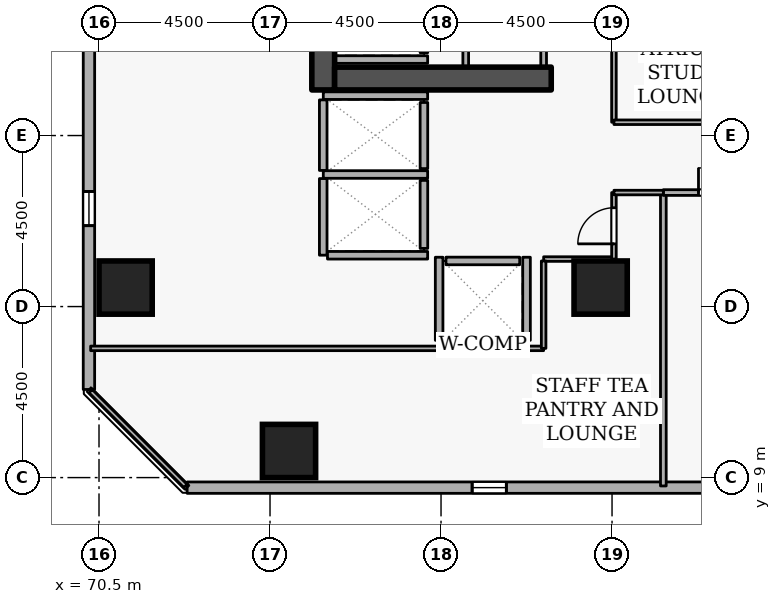
"""IFC4 building model, lengths in metres.
Left out: names, types, materials, properties, quantities, classifications, styles, units other than length and angle.
Written with IfcOpenShell. Run it as: python <this file> out.ifc"""

import sys

from ifc_helpers import new_model, si_unit, direction, frame, frame_2d, origin, origin_2d, place, context, subcontext, project, spatial, rectangle, extrude, element, fill, save


model = new_model("IFC4")
c1 = context("Model", 3, precision=1e-05, world=origin(), true_north=direction((0.0, 1.0)))
c2 = subcontext(c1, "Body", "Model", "MODEL_VIEW")
j1 = project(units=[si_unit("LENGTHUNIT", "METRE"), si_unit("PLANEANGLEUNIT", "RADIAN")], contexts=[c1])
p1 = place(None, origin())
s1 = spatial("IfcSite", under=j1, at=p1, CompositionType="ELEMENT")
p2 = place(p1, origin())
s2 = spatial("IfcBuilding", under=s1, at=p2, CompositionType="ELEMENT")
p3 = place(p2, frame((0.0, 0.0, 60.9)))
s3 = spatial("IfcBuildingStorey", under=s2, at=p3, CompositionType="ELEMENT", Elevation=60.9)
p4 = place(p3, frame((76.4, 19.2, 0.0), z_axis=(0.0, 0.0, 1.0), x_axis=(0.0, 1.0, 0.0)))
e1 = element("IfcWall", 1, at=p4, inside=s3, PredefinedType="SHEAR", context=c2, shape_type="SweptSolid", body=[
    extrude(rectangle(XDim=15.6, YDim=0.6, at=frame_2d((7.8, 0.0))), origin(), (0.0, 0.0, 1.0), 3.6),
])
p5 = place(p3, frame((76.7, 19.5, 0.0), z_axis=(0.0, 0.0, 1.0), x_axis=(1.0, 0.0, 0.0)))
e2 = element("IfcWall", 2, at=p5, inside=s3, PredefinedType="SHEAR", context=c2, shape_type="SweptSolid", body=[
    extrude(rectangle(XDim=5.7, YDim=0.6, at=frame_2d((2.85, 0.0))), origin(), (0.0, 0.0, 1.0), 3.6),
])
for number, where, z_axis, x_axis in (
    (3, (71.2, 14.0, 0.0), (0.0, 0.0, 1.0), (1.0, 0.0, 0.0)),
    (4, (75.5, 9.7, 0.0), (0.0, 0.0, 1.0), (1.0, 0.0, 0.0)),
    (5, (83.7, 14.0, 0.0), (0.0, 0.0, 1.0), (1.0, 0.0, 0.0)),
):
    element("IfcColumn", number, at=place(p3, frame(where, z_axis=z_axis, x_axis=x_axis)), inside=s3, PredefinedType="COLUMN", context=c2, shape_type="SweptSolid", body=[
        extrude(rectangle(XDim=1.4, YDim=1.4, at=origin_2d()), origin(), (0.0, 0.0, 1.0), 3.6),
    ])
p6 = place(p3, frame((72.819, 8.735, 0.0), z_axis=(0.0, 0.0, 1.0), x_axis=(0.999999998209, 5.985515e-05, 0.0)))
e6 = element("IfcWall", 6, at=p6, inside=s3, PredefinedType="STANDARD", context=c2, shape_type="SweptSolid", body=[
    extrude(rectangle(XDim=36.71, YDim=0.3, at=frame_2d((18.355, 0.0))), origin(), (0.0, 0.0, 1.0), 2.7),
])
p7 = place(p6, frame((7.5, 0.0, 0.72)))
e7 = element("IfcOpeningElement", 7, at=p7, cuts=e6, PredefinedType="OPENING", context=c2, shape_type="SweptSolid", body=[
    extrude(rectangle(XDim=0.9, YDim=1.75, at=frame_2d((0.45, 0.875))), frame((0.0, 0.16, 0.0), z_axis=(0.0, -1.0, 0.0), x_axis=(1.0, 0.0, 0.0)), (0.0, 0.0, 1.0), 0.32),
])
p8 = place(p6, frame((17.1, 0.0, 0.72)))
e8 = element("IfcOpeningElement", 8, at=p8, cuts=e6, PredefinedType="OPENING", context=c2, shape_type="SweptSolid", body=[
    extrude(rectangle(XDim=0.9, YDim=1.75, at=frame_2d((0.45, 0.875))), frame((0.0, 0.16, 0.0), z_axis=(0.0, -1.0, 0.0), x_axis=(1.0, 0.0, 0.0)), (0.0, 0.0, 1.0), 0.32),
])
p9 = place(p6, frame((21.9, 0.0, 0.72)))
e9 = element("IfcOpeningElement", 9, at=p9, cuts=e6, PredefinedType="OPENING", context=c2, shape_type="SweptSolid", body=[
    extrude(rectangle(XDim=0.9, YDim=1.75, at=frame_2d((0.45, 0.875))), frame((0.0, 0.16, 0.0), z_axis=(0.0, -1.0, 0.0), x_axis=(1.0, 0.0, 0.0)), (0.0, 0.0, 1.0), 0.32),
])
p10 = place(p6, frame((26.7, 0.0, 0.72)))
e10 = element("IfcOpeningElement", 10, at=p10, cuts=e6, PredefinedType="OPENING", context=c2, shape_type="SweptSolid", body=[
    extrude(rectangle(XDim=0.9, YDim=1.75, at=frame_2d((0.45, 0.875))), frame((0.0, 0.16, 0.0), z_axis=(0.0, -1.0, 0.0), x_axis=(1.0, 0.0, 0.0)), (0.0, 0.0, 1.0), 0.32),
])
p11 = place(p3, frame((70.237, 48.029, 0.0), z_axis=(0.0, 0.0, 1.0), x_axis=(-5.985515e-05, -0.999999998209, 0.0)))
e11 = element("IfcWall", 11, at=p11, inside=s3, PredefinedType="STANDARD", context=c2, shape_type="SweptSolid", body=[
    extrude(rectangle(XDim=36.71, YDim=0.3, at=frame_2d((18.355, 0.0))), origin(), (0.0, 0.0, 1.0), 2.7),
])
p12 = place(p11, frame((2.7, 0.0, 0.72)))
e12 = element("IfcOpeningElement", 12, at=p12, cuts=e11, PredefinedType="OPENING", context=c2, shape_type="SweptSolid", body=[
    extrude(rectangle(XDim=0.9, YDim=1.75, at=frame_2d((0.45, 0.875))), frame((0.0, 0.16, 0.0), z_axis=(0.0, -1.0, 0.0), x_axis=(1.0, 0.0, 0.0)), (0.0, 0.0, 1.0), 0.32),
])
p13 = place(p11, frame((12.3, 0.0, 0.72)))
e13 = element("IfcOpeningElement", 13, at=p13, cuts=e11, PredefinedType="OPENING", context=c2, shape_type="SweptSolid", body=[
    extrude(rectangle(XDim=0.9, YDim=1.75, at=frame_2d((0.45, 0.875))), frame((0.0, 0.16, 0.0), z_axis=(0.0, -1.0, 0.0), x_axis=(1.0, 0.0, 0.0)), (0.0, 0.0, 1.0), 0.32),
])
p14 = place(p11, frame((17.1, 0.0, 0.72)))
e14 = element("IfcOpeningElement", 14, at=p14, cuts=e11, PredefinedType="OPENING", context=c2, shape_type="SweptSolid", body=[
    extrude(rectangle(XDim=0.9, YDim=1.75, at=frame_2d((0.45, 0.875))), frame((0.0, 0.16, 0.0), z_axis=(0.0, -1.0, 0.0), x_axis=(1.0, 0.0, 0.0)), (0.0, 0.0, 1.0), 0.32),
])
p15 = place(p11, frame((26.7, 0.0, 0.72)))
e15 = element("IfcOpeningElement", 15, at=p15, cuts=e11, PredefinedType="OPENING", context=c2, shape_type="SweptSolid", body=[
    extrude(rectangle(XDim=0.9, YDim=1.75, at=frame_2d((0.45, 0.875))), frame((0.0, 0.16, 0.0), z_axis=(0.0, -1.0, 0.0), x_axis=(1.0, 0.0, 0.0)), (0.0, 0.0, 1.0), 0.32),
])
p16 = place(p11, frame((31.5, 0.0, 0.72)))
e16 = element("IfcOpeningElement", 16, at=p16, cuts=e11, PredefinedType="OPENING", context=c2, shape_type="SweptSolid", body=[
    extrude(rectangle(XDim=0.9, YDim=1.75, at=frame_2d((0.45, 0.875))), frame((0.0, 0.16, 0.0), z_axis=(0.0, -1.0, 0.0), x_axis=(1.0, 0.0, 0.0)), (0.0, 0.0, 1.0), 0.32),
])
p17 = place(p3, frame((79.05, 20.18, 0.0), z_axis=(0.0, 0.0, 1.0), x_axis=(0.0, 1.0, 0.0)))
e17 = element("IfcWall", 17, at=p17, inside=s3, PredefinedType="STANDARD", context=c2, shape_type="SweptSolid", body=[
    extrude(rectangle(XDim=1.94, YDim=0.2, at=frame_2d((0.97, 0.0))), origin(), (0.0, 0.0, 1.0), 3.34),
])
p18 = place(p3, frame((79.05, 17.13, 0.0), z_axis=(0.0, 0.0, 1.0), x_axis=(0.0, 1.0, 0.0)))
e18 = element("IfcWall", 18, at=p18, inside=s3, PredefinedType="STANDARD", context=c2, shape_type="SweptSolid", body=[
    extrude(rectangle(XDim=1.74, YDim=0.2, at=frame_2d((0.87, 0.0))), origin(), (0.0, 0.0, 1.0), 3.34),
])
p19 = place(p3, frame((79.05, 15.03, 0.0), z_axis=(0.0, 0.0, 1.0), x_axis=(0.0, 1.0, 0.0)))
e19 = element("IfcWall", 19, at=p19, inside=s3, PredefinedType="STANDARD", context=c2, shape_type="SweptSolid", body=[
    extrude(rectangle(XDim=1.79, YDim=0.2, at=frame_2d((0.895, 0.0))), origin(), (0.0, 0.0, 1.0), 3.34),
])
p20 = place(p3, frame((79.63, 14.7, 0.0), z_axis=(0.0, 0.0, 1.0), x_axis=(1.0, 0.0, 0.0)))
e20 = element("IfcWall", 20, at=p20, inside=s3, PredefinedType="STANDARD", context=c2, shape_type="SweptSolid", body=[
    extrude(rectangle(XDim=1.94, YDim=0.2, at=frame_2d((0.97, 0.0))), origin(), (0.0, 0.0, 1.0), 3.34),
])
p21 = place(p3, frame((76.712, 20.0, 0.0), z_axis=(0.0, 0.0, 1.0), x_axis=(1.0, 0.0, 0.0)))
e21 = element("IfcWall", 21, at=p21, inside=s3, PredefinedType="STANDARD", context=c2, shape_type="SweptSolid", body=[
    extrude(rectangle(XDim=2.436, YDim=0.2, at=frame_2d((1.218, 0.0))), origin(), (0.0, 0.0, 1.0), 3.34),
])
p22 = place(p3, frame((76.402, 19.05, 0.0), z_axis=(0.0, 0.0, 1.0), x_axis=(1.0, 0.0, 0.0)))
e22 = element("IfcWall", 22, at=p22, inside=s3, PredefinedType="STANDARD", context=c2, shape_type="SweptSolid", body=[
    extrude(rectangle(XDim=2.746, YDim=0.2, at=frame_2d((1.373, 0.0))), origin(), (0.0, 0.0, 1.0), 2.545),
])
p23 = place(p3, frame((76.402, 16.975, 0.0), z_axis=(0.0, 0.0, 1.0), x_axis=(1.0, 0.0, 0.0)))
e23 = element("IfcWall", 23, at=p23, inside=s3, PredefinedType="STANDARD", context=c2, shape_type="SweptSolid", body=[
    extrude(rectangle(XDim=2.746, YDim=0.2, at=frame_2d((1.373, 0.0))), origin(), (0.0, 0.0, 1.0), 3.34),
])
p24 = place(p3, frame((76.4, 14.852, 0.0), z_axis=(0.0, 0.0, 1.0), x_axis=(0.0, 1.0, 0.0)))
e24 = element("IfcWall", 24, at=p24, inside=s3, PredefinedType="STANDARD", context=c2, shape_type="SweptSolid", body=[
    extrude(rectangle(XDim=2.016, YDim=0.2, at=frame_2d((1.008, 0.0))), origin(), (0.0, 0.0, 1.0), 3.34),
])
p25 = place(p3, frame((76.4, 17.082, 0.0), z_axis=(0.0, 0.0, 1.0), x_axis=(0.0, 1.0, 0.0)))
e25 = element("IfcWall", 25, at=p25, inside=s3, PredefinedType="STANDARD", context=c2, shape_type="SweptSolid", body=[
    extrude(rectangle(XDim=1.856, YDim=0.2, at=frame_2d((0.928, 0.0))), origin(), (0.0, 0.0, 1.0), 3.34),
])
p26 = place(p3, frame((76.512, 14.85, 0.0), z_axis=(0.0, 0.0, 1.0), x_axis=(1.0, 0.0, 0.0)))
e26 = element("IfcWall", 26, at=p26, inside=s3, PredefinedType="STANDARD", context=c2, shape_type="SweptSolid", body=[
    extrude(rectangle(XDim=2.636, YDim=0.2, at=frame_2d((1.318, 0.0))), origin(), (0.0, 0.0, 1.0), 3.34),
])
p27 = place(p3, frame((79.452, 12.5, 0.0), z_axis=(0.0, 0.0, 1.0), x_axis=(1.0, 0.0, 0.0)))
e27 = element("IfcWall", 27, at=p27, inside=s3, PredefinedType="STANDARD", context=c2, shape_type="SweptSolid", body=[
    extrude(rectangle(XDim=2.296, YDim=0.2, at=frame_2d((1.148, 0.0))), origin(), (0.0, 0.0, 1.0), 3.34),
])
for number, where, z_axis, x_axis in (
    (28, (81.75, 12.612, 0.0), (0.0, 0.0, 1.0), (0.0, 1.0, 0.0)),
    (29, (79.45, 12.612, 0.0), (0.0, 0.0, 1.0), (0.0, 1.0, 0.0)),
):
    element("IfcWall", number, at=place(p3, frame(where, z_axis=z_axis, x_axis=x_axis)), inside=s3, PredefinedType="STANDARD", context=c2, shape_type="SweptSolid", body=[
        extrude(rectangle(XDim=2.186, YDim=0.2, at=frame_2d((1.093, 0.0))), origin(), (0.0, 0.0, 1.0), 3.34),
    ])
p28 = place(p3, frame((80.15, 19.8, 0.0), z_axis=(0.0, 0.0, 1.0), x_axis=(0.0, 1.0, 0.0)))
e30 = element("IfcWall", 30, at=p28, inside=s3, PredefinedType="PARTITIONING", context=c2, shape_type="SweptSolid", body=[
    extrude(rectangle(XDim=4.25, YDim=0.15, at=frame_2d((2.125, 0.0))), origin(), (0.0, 0.0, 1.0), 3.34),
])
p29 = place(p3, frame((82.2, 24.05, 0.0), z_axis=(0.0, 0.0, 1.0), x_axis=(0.0, -1.0, 0.0)))
e31 = element("IfcWall", 31, at=p29, inside=s3, PredefinedType="PARTITIONING", context=c2, shape_type="SweptSolid", body=[
    extrude(rectangle(XDim=4.25, YDim=0.15, at=frame_2d((2.125, 0.0))), origin(), (0.0, 0.0, 1.0), 3.34),
])
p30 = place(p29, frame((1.665, 0.0, 0.0)))
e32 = element("IfcOpeningElement", 32, at=p30, cuts=e31, PredefinedType="OPENING", context=c2, shape_type="SweptSolid", body=[
    extrude(rectangle(XDim=0.92, YDim=2.08, at=frame_2d((0.46, 1.04))), frame((0.0, 0.085, 0.0), z_axis=(0.0, -1.0, 0.0), x_axis=(1.0, 0.0, 0.0)), (0.0, 0.0, 1.0), 0.17),
])
p31 = place(p3, frame((85.35, 8.78, 0.0), z_axis=(0.0, 0.0, 1.0), x_axis=(0.0, 1.0, 0.0)))
e33 = element("IfcWall", 33, at=p31, inside=s3, PredefinedType="PARTITIONING", context=c2, shape_type="SweptSolid", body=[
    extrude(rectangle(XDim=7.72, YDim=0.15, at=frame_2d((3.86, 0.0))), origin(), (0.0, 0.0, 1.0), 3.34),
])
p32 = place(p3, frame((85.35, 16.5, 0.0), z_axis=(0.0, 0.0, 1.0), x_axis=(1.0, 0.0, 0.0)))
e34 = element("IfcWall", 34, at=p32, inside=s3, PredefinedType="PARTITIONING", context=c2, shape_type="SweptSolid", body=[
    extrude(rectangle(XDim=3.15, YDim=0.15, at=frame_2d((1.575, 0.0))), origin(), (0.0, 0.0, 1.0), 3.34),
])
p33 = place(p32, frame((0.925, 0.0, 0.0)))
e35 = element("IfcOpeningElement", 35, at=p33, cuts=e34, PredefinedType="OPENING", context=c2, shape_type="SweptSolid", body=[
    extrude(rectangle(XDim=1.3, YDim=2.12, at=frame_2d((0.65, 1.06))), frame((0.0, 0.085, 0.0), z_axis=(0.0, -1.0, 0.0), x_axis=(1.0, 0.0, 0.0)), (0.0, 0.0, 1.0), 0.17),
])
p34 = place(p3, frame((82.2, 14.75, 0.0), z_axis=(0.0, 0.0, 1.0), x_axis=(1.0, 0.0, 0.0)))
e36 = element("IfcWall", 36, at=p34, inside=s3, PredefinedType="PARTITIONING", context=c2, shape_type="SweptSolid", body=[
    extrude(rectangle(XDim=1.85, YDim=0.12, at=frame_2d((0.925, 0.0))), origin(), (0.0, 0.0, 1.0), 3.34),
])
p35 = place(p3, frame((84.05, 14.75, 0.0), z_axis=(0.0, 0.0, 1.0), x_axis=(0.0, 1.0, 0.0)))
e37 = element("IfcWall", 37, at=p35, inside=s3, PredefinedType="PARTITIONING", context=c2, shape_type="SweptSolid", body=[
    extrude(rectangle(XDim=1.75, YDim=0.12, at=frame_2d((0.875, 0.0))), origin(), (0.0, 0.0, 1.0), 3.34),
])
p36 = place(p35, frame((0.4, 0.0, 0.0)))
e38 = element("IfcOpeningElement", 38, at=p36, cuts=e37, PredefinedType="OPENING", context=c2, shape_type="SweptSolid", body=[
    extrude(rectangle(XDim=0.95, YDim=2.1, at=frame_2d((0.475, 1.05))), frame((0.0, 0.07, 0.0), z_axis=(0.0, -1.0, 0.0), x_axis=(1.0, 0.0, 0.0)), (0.0, 0.0, 1.0), 0.14),
])
p37 = place(p3, frame((84.05, 16.5, 0.0), z_axis=(0.0, 0.0, 1.0), x_axis=(1.0, 0.0, 0.0)))
e39 = element("IfcWall", 39, at=p37, inside=s3, PredefinedType="PARTITIONING", context=c2, shape_type="SweptSolid", body=[
    extrude(rectangle(XDim=1.3, YDim=0.12, at=frame_2d((0.65, 0.0))), origin(), (0.0, 0.0, 1.0), 3.34),
])
p38 = place(p3, frame((72.775, 8.78, 0.0), z_axis=(0.0, 0.0, 1.0), x_axis=(-0.707106781187, 0.707106781187, 0.0)))
e40 = element("IfcWall", 40, at=p38, inside=s3, PredefinedType="PARTITIONING", context=c2, shape_type="SweptSolid", body=[
    extrude(rectangle(XDim=3.528, YDim=0.12, at=frame_2d((1.764, 0.0))), origin(), (0.0, 0.0, 1.0), 3.34),
])
p39 = place(p3, frame((70.28, 12.4, 0.0), z_axis=(0.0, 0.0, 1.0), x_axis=(1.0, 0.0, 0.0)))
e41 = element("IfcWall", 41, at=p39, inside=s3, PredefinedType="PARTITIONING", context=c2, shape_type="SweptSolid", body=[
    extrude(rectangle(XDim=9.172, YDim=0.12, at=frame_2d((4.586, 0.0))), origin(), (0.0, 0.0, 1.0), 3.34),
])
p40 = place(p3, frame((81.748, 12.4, 0.0), z_axis=(0.0, 0.0, 1.0), x_axis=(1.0, 0.0, 0.0)))
e42 = element("IfcWall", 42, at=p40, inside=s3, PredefinedType="PARTITIONING", context=c2, shape_type="SweptSolid", body=[
    extrude(rectangle(XDim=0.452, YDim=0.12, at=frame_2d((0.226, 0.0))), origin(), (0.0, 0.0, 1.0), 3.34),
])
p41 = place(p3, frame((82.2, 12.4, 0.0), z_axis=(0.0, 0.0, 1.0), x_axis=(0.0, 1.0, 0.0)))
e43 = element("IfcWall", 43, at=p41, inside=s3, PredefinedType="PARTITIONING", context=c2, shape_type="SweptSolid", body=[
    extrude(rectangle(XDim=2.3, YDim=0.12, at=frame_2d((1.15, 0.0))), origin(), (0.0, 0.0, 1.0), 3.34),
])
p42 = place(p3, frame((84.05, 18.35, 0.0), z_axis=(0.0, 0.0, 1.0), x_axis=(0.0, 1.0, 0.0)))
e44 = element("IfcWall", 44, at=p42, inside=s3, PredefinedType="PARTITIONING", context=c2, shape_type="SweptSolid", body=[
    extrude(rectangle(XDim=3.45, YDim=0.12, at=frame_2d((1.725, 0.0))), origin(), (0.0, 0.0, 1.0), 3.34),
])
p43 = place(p3, frame((92.95, 18.35, 0.0), z_axis=(0.0, 0.0, 1.0), x_axis=(-1.0, 0.0, 0.0)))
e45 = element("IfcWall", 45, at=p43, inside=s3, PredefinedType="PARTITIONING", context=c2, shape_type="SweptSolid", body=[
    extrude(rectangle(XDim=8.9, YDim=0.12, at=frame_2d((4.45, 0.0))), origin(), (0.0, 0.0, 1.0), 3.34),
])
p44 = place(p43, frame((3.975, 0.0, 0.0)))
e46 = element("IfcOpeningElement", 46, at=p44, cuts=e45, PredefinedType="OPENING", context=c2, shape_type="SweptSolid", body=[
    extrude(rectangle(XDim=0.95, YDim=2.1, at=frame_2d((0.475, 1.05))), frame((0.0, 0.07, 0.0), z_axis=(0.0, -1.0, 0.0), x_axis=(1.0, 0.0, 0.0)), (0.0, 0.0, 1.0), 0.14),
])
p45 = place(p7, origin())
e47 = element("IfcWindow", 47, at=p45, inside=s3, PartitioningType="SINGLE_PANEL", PredefinedType="WINDOW", context=c2, shape_type="SweptSolid", body=[
    extrude(rectangle(XDim=0.9, YDim=1.75, at=frame_2d((0.45, 0.875))), frame((0.0, 0.03, 0.0), z_axis=(0.0, -1.0, 0.0), x_axis=(1.0, 0.0, 0.0)), (0.0, 0.0, 1.0), 0.06),
])
fill(e7, e47)
p46 = place(p16, origin())
e48 = element("IfcWindow", 48, at=p46, inside=s3, PartitioningType="SINGLE_PANEL", PredefinedType="WINDOW", context=c2, shape_type="SweptSolid", body=[
    extrude(rectangle(XDim=0.9, YDim=1.75, at=frame_2d((0.45, 0.875))), frame((0.0, 0.03, 0.0), z_axis=(0.0, -1.0, 0.0), x_axis=(1.0, 0.0, 0.0)), (0.0, 0.0, 1.0), 0.06),
])
fill(e16, e48)
p47 = place(p33, origin())
e49 = element("IfcDoor", 49, at=p47, inside=s3, OperationType="DOUBLE_DOOR_SINGLE_SWING", PredefinedType="DOOR", context=c2, shape_type="SweptSolid", body=[
    extrude(rectangle(XDim=1.3, YDim=2.12, at=frame_2d((0.65, 1.06))), frame((0.0, 0.025, 0.0), z_axis=(0.0, -1.0, 0.0), x_axis=(1.0, 0.0, 0.0)), (0.0, 0.0, 1.0), 0.05),
])
fill(e35, e49)
p48 = place(p36, origin())
e50 = element("IfcDoor", 50, at=p48, inside=s3, OperationType="SINGLE_SWING_LEFT", PredefinedType="DOOR", context=c2, shape_type="SweptSolid", body=[
    extrude(rectangle(XDim=0.95, YDim=2.1, at=frame_2d((0.475, 1.05))), frame((0.0, 0.025, 0.0), z_axis=(0.0, -1.0, 0.0), x_axis=(1.0, 0.0, 0.0)), (0.0, 0.0, 1.0), 0.05),
])
fill(e38, e50)
save(model, sys.argv[1])
